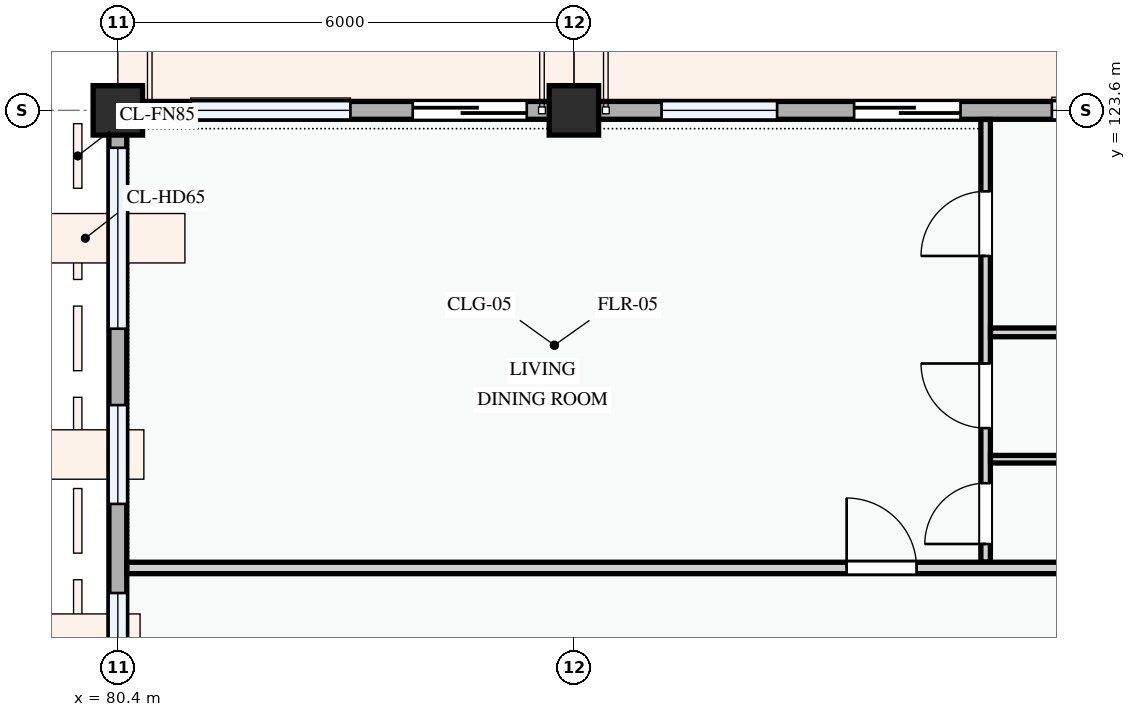
"""IFC4 building model, lengths in metres.
Left out: names, types, materials, properties, quantities, classifications, styles, units other than length and angle.
Written with IfcOpenShell. Run it as: python <this file> out.ifc"""

import sys

from ifc_helpers import new_model, si_unit, direction, frame, frame_2d, origin, origin_2d, place, context, subcontext, project, spatial, rectangle, extrude, element, fill, save


model = new_model("IFC4")
c1 = context("Model", 3, precision=1e-05, world=origin(), true_north=direction((0.0, 1.0)))
c2 = subcontext(c1, "Body", "Model", "MODEL_VIEW")
j1 = project(units=[si_unit("LENGTHUNIT", "METRE"), si_unit("PLANEANGLEUNIT", "RADIAN")], contexts=[c1])
p1 = place(None, origin())
s1 = spatial("IfcSite", under=j1, at=p1, CompositionType="ELEMENT")
p2 = place(p1, origin())
s2 = spatial("IfcBuilding", under=s1, at=p2, CompositionType="ELEMENT")
p3 = place(p2, frame((0.0, 0.0, 8.1)))
s3 = spatial("IfcBuildingStorey", under=s2, at=p3, CompositionType="ELEMENT", Elevation=8.1)
for number, where, z_axis, x_axis in (
    (1, (80.4, 123.6, 0.0), (0.0, 0.0, 1.0), (1.0, 0.0, 0.0)),
    (2, (86.4, 123.6, 0.0), (0.0, 0.0, 1.0), (1.0, 0.0, 0.0)),
):
    element("IfcColumn", number, at=place(p3, frame(where, z_axis=z_axis, x_axis=x_axis)), inside=s3, PredefinedType="COLUMN", context=c2, shape_type="SweptSolid", body=[
        extrude(rectangle(XDim=0.65, YDim=0.65, at=origin_2d()), origin(), (0.0, 0.0, 1.0), 3.3),
    ])
p4 = place(p3, frame((94.8, 123.6, 0.0), z_axis=(0.0, 0.0, 1.0), x_axis=(-1.0, 0.0, 0.0)))
e3 = element("IfcWall", 3, at=p4, inside=s3, PredefinedType="STANDARD", context=c2, shape_type="SweptSolid", body=[
    extrude(rectangle(XDim=8.4, YDim=0.235, at=frame_2d((4.2, 0.0))), origin(), (0.0, 0.0, 1.0), 2.345),
])
p5 = place(p4, frame((3.313, 0.0, 0.0)))
e4 = element("IfcOpeningElement", 4, at=p5, cuts=e3, PredefinedType="OPENING", context=c2, shape_type="SweptSolid", body=[
    extrude(rectangle(XDim=1.4, YDim=2.2, at=frame_2d((0.7, 1.1))), frame((0.0, 0.127, 0.0), z_axis=(0.0, -1.0, 0.0), x_axis=(1.0, 0.0, 0.0)), (0.0, 0.0, 1.0), 0.255),
])
p6 = place(p4, frame((1.062, 0.0, 0.78)))
e5 = element("IfcOpeningElement", 5, at=p6, cuts=e3, PredefinedType="OPENING", context=c2, shape_type="SweptSolid", body=[
    extrude(rectangle(XDim=1.05, YDim=1.2, at=frame_2d((0.525, 0.6))), frame((0.0, 0.127, 0.0), z_axis=(0.0, -1.0, 0.0), x_axis=(1.0, 0.0, 0.0)), (0.0, 0.0, 1.0), 0.255),
])
p7 = place(p4, frame((5.727, 0.0, 0.78)))
e6 = element("IfcOpeningElement", 6, at=p7, cuts=e3, PredefinedType="OPENING", context=c2, shape_type="SweptSolid", body=[
    extrude(rectangle(XDim=1.52, YDim=1.42, at=frame_2d((0.76, 0.71))), frame((0.0, 0.127, 0.0), z_axis=(0.0, -1.0, 0.0), x_axis=(1.0, 0.0, 0.0)), (0.0, 0.0, 1.0), 0.255),
])
p8 = place(p3, frame((86.4, 123.6, 0.0), z_axis=(0.0, 0.0, 1.0), x_axis=(-1.0, 0.0, 0.0)))
e7 = element("IfcWall", 7, at=p8, inside=s3, PredefinedType="STANDARD", context=c2, shape_type="SweptSolid", body=[
    extrude(rectangle(XDim=6.0, YDim=0.235, at=frame_2d((3.0, 0.0))), origin(), (0.0, 0.0, 1.0), 2.445),
])
p9 = place(p8, frame((0.62, 0.0, 0.0)))
e8 = element("IfcOpeningElement", 8, at=p9, cuts=e7, PredefinedType="OPENING", context=c2, shape_type="SweptSolid", body=[
    extrude(rectangle(XDim=1.5, YDim=2.2, at=frame_2d((0.75, 1.1))), frame((0.0, 0.127, 0.0), z_axis=(0.0, -1.0, 0.0), x_axis=(1.0, 0.0, 0.0)), (0.0, 0.0, 1.0), 0.255),
])
p10 = place(p8, frame((2.94, 0.0, 0.78)))
e9 = element("IfcOpeningElement", 9, at=p10, cuts=e7, PredefinedType="OPENING", context=c2, shape_type="SweptSolid", body=[
    extrude(rectangle(XDim=2.1, YDim=1.55, at=frame_2d((1.05, 0.775))), frame((0.0, 0.127, 0.0), z_axis=(0.0, -1.0, 0.0), x_axis=(1.0, 0.0, 0.0)), (0.0, 0.0, 1.0), 0.255),
])
p11 = place(p3, frame((80.4, 123.6, 0.0), z_axis=(0.0, 0.0, 1.0), x_axis=(0.0, -1.0, 0.0)))
e10 = element("IfcWall", 10, at=p11, inside=s3, PredefinedType="STANDARD", context=c2, shape_type="SweptSolid", body=[
    extrude(rectangle(XDim=8.4, YDim=0.235, at=frame_2d((4.2, 0.0))), origin(), (0.0, 0.0, 1.0), 2.425),
])
p12 = place(p11, frame((0.492, 0.0, 0.78)))
e11 = element("IfcOpeningElement", 11, at=p12, cuts=e10, PredefinedType="OPENING", context=c2, shape_type="SweptSolid", body=[
    extrude(rectangle(XDim=2.38, YDim=1.48, at=frame_2d((1.19, 0.74))), frame((0.0, 0.127, 0.0), z_axis=(0.0, -1.0, 0.0), x_axis=(1.0, 0.0, 0.0)), (0.0, 0.0, 1.0), 0.255),
])
p13 = place(p11, frame((3.877, 0.0, 0.78)))
e12 = element("IfcOpeningElement", 12, at=p13, cuts=e10, PredefinedType="OPENING", context=c2, shape_type="SweptSolid", body=[
    extrude(rectangle(XDim=1.3, YDim=1.4, at=frame_2d((0.65, 0.7))), frame((0.0, 0.127, 0.0), z_axis=(0.0, -1.0, 0.0), x_axis=(1.0, 0.0, 0.0)), (0.0, 0.0, 1.0), 0.255),
])
p14 = place(p11, frame((6.35, 0.0, 0.78)))
e13 = element("IfcOpeningElement", 13, at=p14, cuts=e10, PredefinedType="OPENING", context=c2, shape_type="SweptSolid", body=[
    extrude(rectangle(XDim=1.2, YDim=1.35, at=frame_2d((0.6, 0.675))), frame((0.0, 0.127, 0.0), z_axis=(0.0, -1.0, 0.0), x_axis=(1.0, 0.0, 0.0)), (0.0, 0.0, 1.0), 0.255),
])
p15 = place(p3, frame((91.817, 117.657, 0.0), z_axis=(0.0, 0.0, 1.0), x_axis=(0.0, 1.0, 0.0)))
e14 = element("IfcWall", 14, at=p15, inside=s3, PredefinedType="PARTITIONING", context=c2, shape_type="SweptSolid", body=[
    extrude(rectangle(XDim=5.823, YDim=0.125, at=frame_2d((2.912, 0.0))), origin(), (0.0, 0.0, 1.0), 3.0),
])
p16 = place(p15, frame((0.238, 0.0, 0.0)))
e15 = element("IfcOpeningElement", 15, at=p16, cuts=e14, PredefinedType="OPENING", context=c2, shape_type="SweptSolid", body=[
    extrude(rectangle(XDim=0.8, YDim=2.1, at=frame_2d((0.4, 1.05))), frame((0.0, 0.073, 0.0), z_axis=(0.0, -1.0, 0.0), x_axis=(1.0, 0.0, 0.0)), (0.0, 0.0, 1.0), 0.145),
])
p17 = place(p15, frame((1.763, 0.0, 0.0)))
e16 = element("IfcOpeningElement", 16, at=p17, cuts=e14, PredefinedType="OPENING", context=c2, shape_type="SweptSolid", body=[
    extrude(rectangle(XDim=0.85, YDim=2.1, at=frame_2d((0.425, 1.05))), frame((0.0, 0.073, 0.0), z_axis=(0.0, -1.0, 0.0), x_axis=(1.0, 0.0, 0.0)), (0.0, 0.0, 1.0), 0.145),
])
p18 = place(p15, frame((4.028, 0.0, 0.0)))
e17 = element("IfcOpeningElement", 17, at=p18, cuts=e14, PredefinedType="OPENING", context=c2, shape_type="SweptSolid", body=[
    extrude(rectangle(XDim=0.85, YDim=2.1, at=frame_2d((0.425, 1.05))), frame((0.0, 0.073, 0.0), z_axis=(0.0, -1.0, 0.0), x_axis=(1.0, 0.0, 0.0)), (0.0, 0.0, 1.0), 0.145),
])
p19 = place(p3, frame((91.881, 120.679, 0.0), z_axis=(0.0, 0.0, 1.0), x_axis=(1.0, 0.0, 0.0)))
e18 = element("IfcWall", 18, at=p19, inside=s3, PredefinedType="PARTITIONING", context=c2, shape_type="SweptSolid", body=[
    extrude(rectangle(XDim=12.127, YDim=0.115, at=frame_2d((6.063, 0.0))), origin(), (0.0, 0.0, 1.0), 3.0),
])
p20 = place(p3, frame((91.881, 119.01, 0.0), z_axis=(0.0, 0.0, 1.0), x_axis=(1.0, 0.0, 0.0)))
e19 = element("IfcWall", 19, at=p20, inside=s3, PredefinedType="PARTITIONING", context=c2, shape_type="SweptSolid", body=[
    extrude(rectangle(XDim=12.127, YDim=0.1, at=frame_2d((6.063, 0.0))), origin(), (0.0, 0.0, 1.0), 3.0),
])
p21 = place(p3, frame((80.52, 117.58, 0.0), z_axis=(0.0, 0.0, 1.0), x_axis=(1.0, 0.0, 0.0)))
e20 = element("IfcWall", 20, at=p21, inside=s3, PredefinedType="PARTITIONING", context=c2, shape_type="SweptSolid", body=[
    extrude(rectangle(XDim=72.021, YDim=0.15, at=frame_2d((36.01, 0.0))), origin(), (0.0, 0.0, 1.0), 3.0),
])
p22 = place(p21, frame((9.469, 0.0, 0.0)))
e21 = element("IfcOpeningElement", 21, at=p22, cuts=e20, PredefinedType="OPENING", context=c2, shape_type="SweptSolid", body=[
    extrude(rectangle(XDim=0.92, YDim=2.1, at=frame_2d((0.46, 1.05))), frame((0.0, 0.085, 0.0), z_axis=(0.0, -1.0, 0.0), x_axis=(1.0, 0.0, 0.0)), (0.0, 0.0, 1.0), 0.17),
])
p23 = place(p21, frame((23.851, 0.0, 0.0)))
e22 = element("IfcOpeningElement", 22, at=p23, cuts=e20, PredefinedType="OPENING", context=c2, shape_type="SweptSolid", body=[
    extrude(rectangle(XDim=0.92, YDim=2.1, at=frame_2d((0.46, 1.05))), frame((0.0, 0.085, 0.0), z_axis=(0.0, -1.0, 0.0), x_axis=(1.0, 0.0, 0.0)), (0.0, 0.0, 1.0), 0.17),
])
p24 = place(p21, frame((52.775, 0.0, 0.0)))
e23 = element("IfcOpeningElement", 23, at=p24, cuts=e20, PredefinedType="OPENING", context=c2, shape_type="SweptSolid", body=[
    extrude(rectangle(XDim=0.92, YDim=2.1, at=frame_2d((0.46, 1.05))), frame((0.0, 0.085, 0.0), z_axis=(0.0, -1.0, 0.0), x_axis=(1.0, 0.0, 0.0)), (0.0, 0.0, 1.0), 0.17),
])
p25 = place(p5, frame((1.4, 0.0, 0.0), z_axis=(0.0, 0.0, 1.0), x_axis=(-1.0, 0.0, 0.0)))
e24 = element("IfcDoor", 24, at=p25, inside=s3, OperationType="SLIDING_TO_LEFT", PredefinedType="DOOR", context=c2, shape_type="SweptSolid", body=[
    extrude(rectangle(XDim=1.4, YDim=2.2, at=frame_2d((0.7, 1.1))), frame((0.0, 0.025, 0.0), z_axis=(0.0, -1.0, 0.0), x_axis=(1.0, 0.0, 0.0)), (0.0, 0.0, 1.0), 0.05),
])
fill(e4, e24)
p26 = place(p6, origin())
e25 = element("IfcWindow", 25, at=p26, inside=s3, PartitioningType="SINGLE_PANEL", PredefinedType="WINDOW", context=c2, shape_type="SweptSolid", body=[
    extrude(rectangle(XDim=1.05, YDim=1.2, at=frame_2d((0.525, 0.6))), frame((0.0, 0.03, 0.0), z_axis=(0.0, -1.0, 0.0), x_axis=(1.0, 0.0, 0.0)), (0.0, 0.0, 1.0), 0.06),
])
fill(e5, e25)
p27 = place(p7, origin())
e26 = element("IfcWindow", 26, at=p27, inside=s3, PartitioningType="SINGLE_PANEL", PredefinedType="WINDOW", context=c2, shape_type="SweptSolid", body=[
    extrude(rectangle(XDim=1.52, YDim=1.42, at=frame_2d((0.76, 0.71))), frame((0.0, 0.03, 0.0), z_axis=(0.0, -1.0, 0.0), x_axis=(1.0, 0.0, 0.0)), (0.0, 0.0, 1.0), 0.06),
])
fill(e6, e26)
p28 = place(p9, frame((1.5, 0.0, 0.0), z_axis=(0.0, 0.0, 1.0), x_axis=(-1.0, 0.0, 0.0)))
e27 = element("IfcDoor", 27, at=p28, inside=s3, OperationType="SLIDING_TO_RIGHT", PredefinedType="DOOR", context=c2, shape_type="SweptSolid", body=[
    extrude(rectangle(XDim=1.5, YDim=2.2, at=frame_2d((0.75, 1.1))), frame((0.0, 0.025, 0.0), z_axis=(0.0, -1.0, 0.0), x_axis=(1.0, 0.0, 0.0)), (0.0, 0.0, 1.0), 0.05),
])
fill(e8, e27)
p29 = place(p10, origin())
e28 = element("IfcWindow", 28, at=p29, inside=s3, PartitioningType="DOUBLE_PANEL_VERTICAL", PredefinedType="WINDOW", context=c2, shape_type="SweptSolid", body=[
    extrude(rectangle(XDim=2.1, YDim=1.55, at=frame_2d((1.05, 0.775))), frame((0.0, 0.03, 0.0), z_axis=(0.0, -1.0, 0.0), x_axis=(1.0, 0.0, 0.0)), (0.0, 0.0, 1.0), 0.06),
])
fill(e9, e28)
p30 = place(p12, origin())
e29 = element("IfcWindow", 29, at=p30, inside=s3, PartitioningType="DOUBLE_PANEL_VERTICAL", PredefinedType="WINDOW", context=c2, shape_type="SweptSolid", body=[
    extrude(rectangle(XDim=2.38, YDim=1.48, at=frame_2d((1.19, 0.74))), frame((0.0, 0.03, 0.0), z_axis=(0.0, -1.0, 0.0), x_axis=(1.0, 0.0, 0.0)), (0.0, 0.0, 1.0), 0.06),
])
fill(e11, e29)
p31 = place(p13, origin())
e30 = element("IfcWindow", 30, at=p31, inside=s3, PartitioningType="SINGLE_PANEL", PredefinedType="WINDOW", context=c2, shape_type="SweptSolid", body=[
    extrude(rectangle(XDim=1.3, YDim=1.4, at=frame_2d((0.65, 0.7))), frame((0.0, 0.03, 0.0), z_axis=(0.0, -1.0, 0.0), x_axis=(1.0, 0.0, 0.0)), (0.0, 0.0, 1.0), 0.06),
])
fill(e12, e30)
p32 = place(p14, origin())
e31 = element("IfcWindow", 31, at=p32, inside=s3, PartitioningType="SINGLE_PANEL", PredefinedType="WINDOW", context=c2, shape_type="SweptSolid", body=[
    extrude(rectangle(XDim=1.2, YDim=1.35, at=frame_2d((0.6, 0.675))), frame((0.0, 0.03, 0.0), z_axis=(0.0, -1.0, 0.0), x_axis=(1.0, 0.0, 0.0)), (0.0, 0.0, 1.0), 0.06),
])
fill(e13, e31)
p33 = place(p16, origin())
e32 = element("IfcDoor", 32, at=p33, inside=s3, OperationType="SINGLE_SWING_LEFT", PredefinedType="DOOR", context=c2, shape_type="SweptSolid", body=[
    extrude(rectangle(XDim=0.8, YDim=2.1, at=frame_2d((0.4, 1.05))), frame((0.0, 0.025, 0.0), z_axis=(0.0, -1.0, 0.0), x_axis=(1.0, 0.0, 0.0)), (0.0, 0.0, 1.0), 0.05),
])
fill(e15, e32)
p34 = place(p17, origin())
e33 = element("IfcDoor", 33, at=p34, inside=s3, OperationType="SINGLE_SWING_RIGHT", PredefinedType="DOOR", context=c2, shape_type="SweptSolid", body=[
    extrude(rectangle(XDim=0.85, YDim=2.1, at=frame_2d((0.425, 1.05))), frame((0.0, 0.025, 0.0), z_axis=(0.0, -1.0, 0.0), x_axis=(1.0, 0.0, 0.0)), (0.0, 0.0, 1.0), 0.05),
])
fill(e16, e33)
p35 = place(p18, origin())
e34 = element("IfcDoor", 34, at=p35, inside=s3, OperationType="SINGLE_SWING_LEFT", PredefinedType="DOOR", context=c2, shape_type="SweptSolid", body=[
    extrude(rectangle(XDim=0.85, YDim=2.1, at=frame_2d((0.425, 1.05))), frame((0.0, 0.025, 0.0), z_axis=(0.0, -1.0, 0.0), x_axis=(1.0, 0.0, 0.0)), (0.0, 0.0, 1.0), 0.05),
])
fill(e17, e34)
p36 = place(p22, origin())
e35 = element("IfcDoor", 35, at=p36, inside=s3, OperationType="SINGLE_SWING_LEFT", PredefinedType="DOOR", context=c2, shape_type="SweptSolid", body=[
    extrude(rectangle(XDim=0.92, YDim=2.1, at=frame_2d((0.46, 1.05))), frame((0.0, 0.025, 0.0), z_axis=(0.0, -1.0, 0.0), x_axis=(1.0, 0.0, 0.0)), (0.0, 0.0, 1.0), 0.05),
])
fill(e21, e35)
save(model, sys.argv[1])
